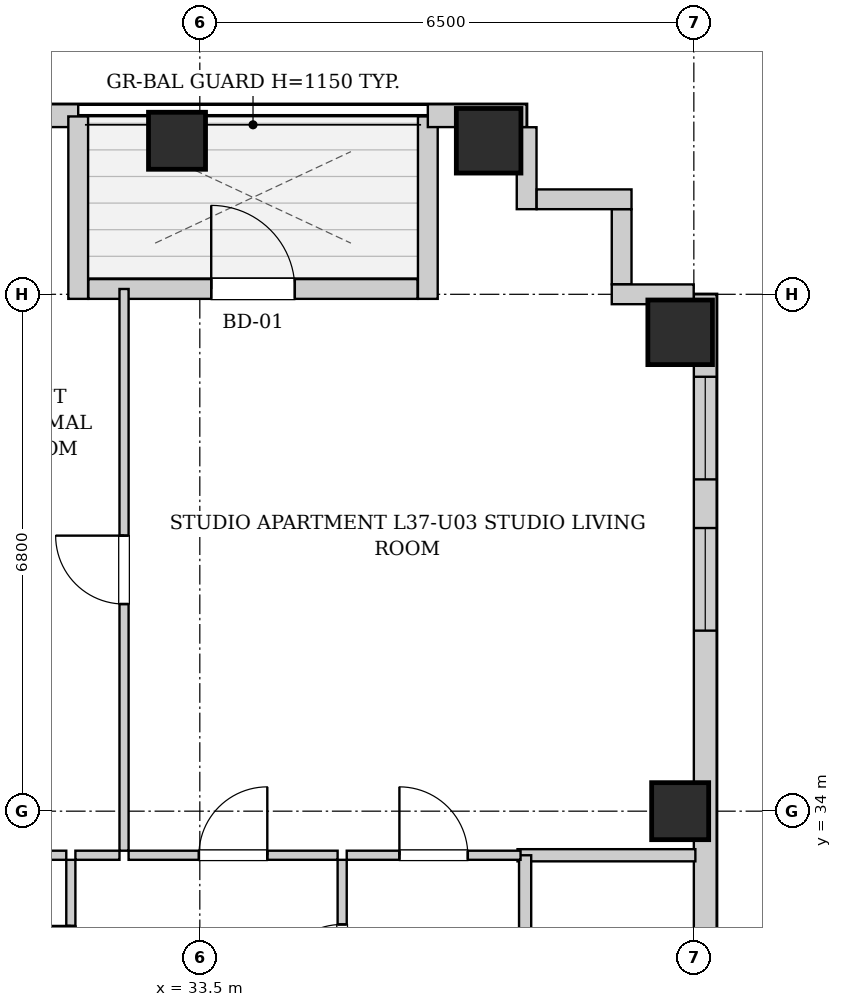
"""IFC4 building model, lengths in metres.
Left out: names, types, materials, properties, quantities, classifications, styles, units other than length and angle.
Written with IfcOpenShell. Run it as: python <this file> out.ifc"""

import sys

from ifc_helpers import new_model, si_unit, direction, frame, frame_2d, origin, origin_2d, place, context, subcontext, project, spatial, rectangle, extrude, element, fill, save


model = new_model("IFC4")
c1 = context("Model", 3, precision=1e-05, world=origin(), true_north=direction((0.0, 1.0)))
c2 = subcontext(c1, "Body", "Model", "MODEL_VIEW")
j1 = project(units=[si_unit("LENGTHUNIT", "METRE"), si_unit("PLANEANGLEUNIT", "RADIAN")], contexts=[c1])
p1 = place(None, origin())
s1 = spatial("IfcSite", under=j1, at=p1, CompositionType="ELEMENT")
p2 = place(p1, origin())
s2 = spatial("IfcBuilding", under=s1, at=p2, CompositionType="ELEMENT")
p3 = place(p2, frame((0.0, 0.0, 130.9)))
s3 = spatial("IfcBuildingStorey", under=s2, at=p3, CompositionType="ELEMENT", Elevation=130.9)
p4 = place(p3, frame((33.2, 42.82, 0.0), z_axis=(0.0, 0.0, 1.0), x_axis=(1.0, 0.0, 0.0)))
e1 = element("IfcColumn", 1, at=p4, inside=s3, PredefinedType="COLUMN", context=c2, shape_type="SweptSolid", body=[
    extrude(rectangle(XDim=0.75, YDim=0.75, at=origin_2d()), origin(), (0.0, 0.0, 1.0), 3.25),
])
p5 = place(p3, frame((37.3, 42.82, 0.0), z_axis=(0.0, 0.0, 1.0), x_axis=(1.0, 0.0, 0.0)))
e2 = element("IfcColumn", 2, at=p5, inside=s3, PredefinedType="COLUMN", context=c2, shape_type="SweptSolid", body=[
    extrude(rectangle(XDim=0.85, YDim=0.85, at=origin_2d()), origin(), (0.0, 0.0, 1.0), 3.25),
])
p6 = place(p3, frame((39.82, 34.0, 0.0), z_axis=(0.0, 0.0, 1.0), x_axis=(1.0, 0.0, 0.0)))
e3 = element("IfcColumn", 3, at=p6, inside=s3, PredefinedType="COLUMN", context=c2, shape_type="SweptSolid", body=[
    extrude(rectangle(XDim=0.75, YDim=0.75, at=origin_2d()), origin(), (0.0, 0.0, 1.0), 3.25),
])
p7 = place(p3, frame((39.82, 40.3, 0.0), z_axis=(0.0, 0.0, 1.0), x_axis=(1.0, 0.0, 0.0)))
e4 = element("IfcColumn", 4, at=p7, inside=s3, PredefinedType="COLUMN", context=c2, shape_type="SweptSolid", body=[
    extrude(rectangle(XDim=0.85, YDim=0.85, at=origin_2d()), origin(), (0.0, 0.0, 1.0), 3.25),
])
p8 = place(p3, frame((10.0, 43.15, 0.0), z_axis=(0.0, 0.0, 1.0), x_axis=(1.0, 0.0, 0.0)))
e5 = element("IfcWall", 5, at=p8, inside=s3, PredefinedType="SOLIDWALL", context=c2, shape_type="SweptSolid", body=[
    extrude(rectangle(XDim=21.9, YDim=0.3, at=frame_2d((10.95, 0.0))), origin(), (0.0, 0.0, 1.0), 2.99),
])
p9 = place(p8, frame((5.475, 0.0, 0.55)))
e6 = element("IfcOpeningElement", 6, at=p9, cuts=e5, PredefinedType="OPENING", context=c2, shape_type="SweptSolid", body=[
    extrude(rectangle(XDim=1.35, YDim=1.2, at=frame_2d((0.675, 0.6))), frame((0.0, 0.16, 0.0), z_axis=(0.0, -1.0, 0.0), x_axis=(1.0, 0.0, 0.0)), (0.0, 0.0, 1.0), 0.32),
])
p10 = place(p8, frame((9.15, 0.0, 0.55)))
e7 = element("IfcOpeningElement", 7, at=p10, cuts=e5, PredefinedType="OPENING", context=c2, shape_type="SweptSolid", body=[
    extrude(rectangle(XDim=1.35, YDim=1.2, at=frame_2d((0.675, 0.6))), frame((0.0, 0.16, 0.0), z_axis=(0.0, -1.0, 0.0), x_axis=(1.0, 0.0, 0.0)), (0.0, 0.0, 1.0), 0.32),
])
p11 = place(p8, frame((17.5, 0.0, 0.55)))
e8 = element("IfcOpeningElement", 8, at=p11, cuts=e5, PredefinedType="OPENING", context=c2, shape_type="SweptSolid", body=[
    extrude(rectangle(XDim=1.35, YDim=1.2, at=frame_2d((0.675, 0.6))), frame((0.0, 0.16, 0.0), z_axis=(0.0, -1.0, 0.0), x_axis=(1.0, 0.0, 0.0)), (0.0, 0.0, 1.0), 0.32),
])
p12 = place(p8, frame((19.8, 0.0, 0.55)))
e9 = element("IfcOpeningElement", 9, at=p12, cuts=e5, PredefinedType="OPENING", context=c2, shape_type="SweptSolid", body=[
    extrude(rectangle(XDim=1.35, YDim=1.2, at=frame_2d((0.675, 0.6))), frame((0.0, 0.16, 0.0), z_axis=(0.0, -1.0, 0.0), x_axis=(1.0, 0.0, 0.0)), (0.0, 0.0, 1.0), 0.32),
])
p13 = place(p3, frame((31.9, 43.14, 0.0), z_axis=(0.0, 0.0, 1.0), x_axis=(0.0, -1.0, 0.0)))
e10 = element("IfcWall", 10, at=p13, inside=s3, PredefinedType="SOLIDWALL", context=c2, shape_type="SweptSolid", body=[
    extrude(rectangle(XDim=2.4, YDim=0.26, at=frame_2d((1.2, 0.0))), origin(), (0.0, 0.0, 1.0), 2.99),
])
p14 = place(p3, frame((32.034, 40.87, 0.0), z_axis=(0.0, 0.0, 1.0), x_axis=(1.0, 0.0, 0.0)))
e11 = element("IfcWall", 11, at=p14, inside=s3, PredefinedType="SOLIDWALL", context=c2, shape_type="SweptSolid", body=[
    extrude(rectangle(XDim=4.332, YDim=0.26, at=frame_2d((2.166, 0.0))), origin(), (0.0, 0.0, 1.0), 2.99),
])
p15 = place(p14, frame((1.616, 0.0, 0.0)))
e12 = element("IfcOpeningElement", 12, at=p15, cuts=e11, PredefinedType="OPENING", context=c2, shape_type="SweptSolid", body=[
    extrude(rectangle(XDim=1.1, YDim=2.0, at=frame_2d((0.55, 1.0))), frame((0.0, 0.14, 0.0), z_axis=(0.0, -1.0, 0.0), x_axis=(1.0, 0.0, 0.0)), (0.0, 0.0, 1.0), 0.28),
])
p16 = place(p3, frame((36.5, 40.74, 0.0), z_axis=(0.0, 0.0, 1.0), x_axis=(0.0, 1.0, 0.0)))
e13 = element("IfcWall", 13, at=p16, inside=s3, PredefinedType="SOLIDWALL", context=c2, shape_type="SweptSolid", body=[
    extrude(rectangle(XDim=2.4, YDim=0.26, at=frame_2d((1.2, 0.0))), origin(), (0.0, 0.0, 1.0), 2.99),
])
p17 = place(p3, frame((36.5, 43.15, 0.0), z_axis=(0.0, 0.0, 1.0), x_axis=(1.0, 0.0, 0.0)))
e14 = element("IfcWall", 14, at=p17, inside=s3, PredefinedType="SOLIDWALL", context=c2, shape_type="SweptSolid", body=[
    extrude(rectangle(XDim=1.3, YDim=0.3, at=frame_2d((0.65, 0.0))), origin(), (0.0, 0.0, 1.0), 2.99),
])
p18 = place(p3, frame((40.15, 40.8, 0.0), z_axis=(0.0, 0.0, 1.0), x_axis=(0.0, -1.0, 0.0)))
e15 = element("IfcWall", 15, at=p18, inside=s3, PredefinedType="SOLIDWALL", context=c2, shape_type="SweptSolid", body=[
    extrude(rectangle(XDim=34.5, YDim=0.3, at=frame_2d((17.25, 0.0))), origin(), (0.0, 0.0, 1.0), 2.99),
])
p19 = place(p18, frame((31.575, 0.0, 0.55)))
e16 = element("IfcOpeningElement", 16, at=p19, cuts=e15, PredefinedType="OPENING", context=c2, shape_type="SweptSolid", body=[
    extrude(rectangle(XDim=1.35, YDim=1.2, at=frame_2d((0.675, 0.6))), frame((0.0, 0.16, 0.0), z_axis=(0.0, -1.0, 0.0), x_axis=(1.0, 0.0, 0.0)), (0.0, 0.0, 1.0), 0.32),
])
p20 = place(p18, frame((3.075, 0.0, 0.55)))
e17 = element("IfcOpeningElement", 17, at=p20, cuts=e15, PredefinedType="OPENING", context=c2, shape_type="SweptSolid", body=[
    extrude(rectangle(XDim=1.35, YDim=1.2, at=frame_2d((0.675, 0.6))), frame((0.0, 0.16, 0.0), z_axis=(0.0, -1.0, 0.0), x_axis=(1.0, 0.0, 0.0)), (0.0, 0.0, 1.0), 0.32),
])
p21 = place(p18, frame((1.085, 0.0, 0.55)))
e18 = element("IfcOpeningElement", 18, at=p21, cuts=e15, PredefinedType="OPENING", context=c2, shape_type="SweptSolid", body=[
    extrude(rectangle(XDim=1.35, YDim=1.2, at=frame_2d((0.675, 0.6))), frame((0.0, 0.16, 0.0), z_axis=(0.0, -1.0, 0.0), x_axis=(1.0, 0.0, 0.0)), (0.0, 0.0, 1.0), 0.32),
])
p22 = place(p18, frame((22.8, 0.0, 0.55)))
e19 = element("IfcOpeningElement", 19, at=p22, cuts=e15, PredefinedType="OPENING", context=c2, shape_type="SweptSolid", body=[
    extrude(rectangle(XDim=1.35, YDim=1.2, at=frame_2d((0.675, 0.6))), frame((0.0, 0.16, 0.0), z_axis=(0.0, -1.0, 0.0), x_axis=(1.0, 0.0, 0.0)), (0.0, 0.0, 1.0), 0.32),
])
p23 = place(p18, frame((13.425, 0.0, 0.55)))
e20 = element("IfcOpeningElement", 20, at=p23, cuts=e15, PredefinedType="OPENING", context=c2, shape_type="SweptSolid", body=[
    extrude(rectangle(XDim=1.35, YDim=1.2, at=frame_2d((0.675, 0.6))), frame((0.0, 0.16, 0.0), z_axis=(0.0, -1.0, 0.0), x_axis=(1.0, 0.0, 0.0)), (0.0, 0.0, 1.0), 0.32),
])
p24 = place(p3, frame((37.8, 42.998, 0.0), z_axis=(0.0, 0.0, 1.0), x_axis=(0.0, -1.0, 0.0)))
e21 = element("IfcWall", 21, at=p24, inside=s3, PredefinedType="SOLIDWALL", context=c2, shape_type="SweptSolid", body=[
    extrude(rectangle(XDim=1.078, YDim=0.26, at=frame_2d((0.539, 0.0))), origin(), (0.0, 0.0, 1.0), 2.99),
])
p25 = place(p3, frame((37.932, 42.05, 0.0), z_axis=(0.0, 0.0, 1.0), x_axis=(1.0, 0.0, 0.0)))
e22 = element("IfcWall", 22, at=p25, inside=s3, PredefinedType="SOLIDWALL", context=c2, shape_type="SweptSolid", body=[
    extrude(rectangle(XDim=1.248, YDim=0.26, at=frame_2d((0.624, 0.0))), origin(), (0.0, 0.0, 1.0), 2.99),
])
p26 = place(p3, frame((39.05, 41.918, 0.0), z_axis=(0.0, 0.0, 1.0), x_axis=(0.0, -1.0, 0.0)))
e23 = element("IfcWall", 23, at=p26, inside=s3, PredefinedType="SOLIDWALL", context=c2, shape_type="SweptSolid", body=[
    extrude(rectangle(XDim=0.986, YDim=0.26, at=frame_2d((0.493, 0.0))), origin(), (0.0, 0.0, 1.0), 2.99),
])
p27 = place(p3, frame((38.92, 40.8, 0.0), z_axis=(0.0, 0.0, 1.0), x_axis=(1.0, 0.0, 0.0)))
e24 = element("IfcWall", 24, at=p27, inside=s3, PredefinedType="SOLIDWALL", context=c2, shape_type="SweptSolid", body=[
    extrude(rectangle(XDim=1.078, YDim=0.26, at=frame_2d((0.539, 0.0))), origin(), (0.0, 0.0, 1.0), 2.99),
])
p28 = place(p3, frame((37.68, 33.42, 0.0), z_axis=(0.0, 0.0, 1.0), x_axis=(1.0, 0.0, 0.0)))
e25 = element("IfcWall", 25, at=p28, inside=s3, PredefinedType="PARTITIONING", context=c2, shape_type="SweptSolid", body=[
    extrude(rectangle(XDim=2.34, YDim=0.16, at=frame_2d((1.17, 0.0))), origin(), (0.0, 0.0, 1.0), 2.99),
])
p29 = place(p3, frame((37.78, 30.76, 0.0), z_axis=(0.0, 0.0, 1.0), x_axis=(0.0, 1.0, 0.0)))
e26 = element("IfcWall", 26, at=p29, inside=s3, PredefinedType="PARTITIONING", context=c2, shape_type="SweptSolid", body=[
    extrude(rectangle(XDim=2.66, YDim=0.16, at=frame_2d((1.33, 0.0))), origin(), (0.0, 0.0, 1.0), 2.99),
])
p30 = place(p3, frame((31.803, 30.76, 0.0), z_axis=(0.0, 0.0, 1.0), x_axis=(0.0, 1.0, 0.0)))
e27 = element("IfcWall", 27, at=p30, inside=s3, PredefinedType="PARTITIONING", context=c2, shape_type="SweptSolid", body=[
    extrude(rectangle(XDim=2.6, YDim=0.12, at=frame_2d((1.3, 0.0))), origin(), (0.0, 0.0, 1.0), 2.99),
])
p31 = place(p30, frame((0.87, 0.0, 0.0)))
e28 = element("IfcOpeningElement", 28, at=p31, cuts=e27, PredefinedType="OPENING", context=c2, shape_type="SweptSolid", body=[
    extrude(rectangle(XDim=0.86, YDim=2.05, at=frame_2d((0.43, 1.025))), frame((0.0, 0.07, 0.0), z_axis=(0.0, -1.0, 0.0), x_axis=(1.0, 0.0, 0.0)), (0.0, 0.0, 1.0), 0.14),
])
p32 = place(p3, frame((29.343, 33.42, 0.0), z_axis=(0.0, 0.0, 1.0), x_axis=(1.0, 0.0, 0.0)))
e29 = element("IfcWall", 29, at=p32, inside=s3, PredefinedType="PARTITIONING", context=c2, shape_type="SweptSolid", body=[
    extrude(rectangle(XDim=2.4, YDim=0.12, at=frame_2d((1.2, 0.0))), origin(), (0.0, 0.0, 1.0), 2.99),
])
p33 = place(p3, frame((35.373, 30.76, 0.0), z_axis=(0.0, 0.0, 1.0), x_axis=(0.0, 1.0, 0.0)))
e30 = element("IfcWall", 30, at=p33, inside=s3, PredefinedType="PARTITIONING", context=c2, shape_type="SweptSolid", body=[
    extrude(rectangle(XDim=2.6, YDim=0.12, at=frame_2d((1.3, 0.0))), origin(), (0.0, 0.0, 1.0), 2.99),
])
p34 = place(p33, frame((0.85, 0.0, 0.0)))
e31 = element("IfcOpeningElement", 31, at=p34, cuts=e30, PredefinedType="OPENING", context=c2, shape_type="SweptSolid", body=[
    extrude(rectangle(XDim=0.9, YDim=2.05, at=frame_2d((0.45, 1.025))), frame((0.0, 0.07, 0.0), z_axis=(0.0, -1.0, 0.0), x_axis=(1.0, 0.0, 0.0)), (0.0, 0.0, 1.0), 0.14),
])
p35 = place(p3, frame((31.863, 33.42, 0.0), z_axis=(0.0, 0.0, 1.0), x_axis=(1.0, 0.0, 0.0)))
e32 = element("IfcWall", 32, at=p35, inside=s3, PredefinedType="PARTITIONING", context=c2, shape_type="SweptSolid", body=[
    extrude(rectangle(XDim=0.58, YDim=0.12, at=frame_2d((0.29, 0.0))), origin(), (0.0, 0.0, 1.0), 2.99),
])
p36 = place(p3, frame((32.563, 33.42, 0.0), z_axis=(0.0, 0.0, 1.0), x_axis=(1.0, 0.0, 0.0)))
e33 = element("IfcWall", 33, at=p36, inside=s3, PredefinedType="PARTITIONING", context=c2, shape_type="SweptSolid", body=[
    extrude(rectangle(XDim=2.75, YDim=0.12, at=frame_2d((1.375, 0.0))), origin(), (0.0, 0.0, 1.0), 2.99),
])
p37 = place(p36, frame((0.925, 0.0, 0.0)))
e34 = element("IfcOpeningElement", 34, at=p37, cuts=e33, PredefinedType="OPENING", context=c2, shape_type="SweptSolid", body=[
    extrude(rectangle(XDim=0.9, YDim=2.05, at=frame_2d((0.45, 1.025))), frame((0.0, 0.07, 0.0), z_axis=(0.0, -1.0, 0.0), x_axis=(1.0, 0.0, 0.0)), (0.0, 0.0, 1.0), 0.14),
])
p38 = place(p3, frame((35.433, 33.42, 0.0), z_axis=(0.0, 0.0, 1.0), x_axis=(1.0, 0.0, 0.0)))
e35 = element("IfcWall", 35, at=p38, inside=s3, PredefinedType="PARTITIONING", context=c2, shape_type="SweptSolid", body=[
    extrude(rectangle(XDim=2.287, YDim=0.12, at=frame_2d((1.144, 0.0))), origin(), (0.0, 0.0, 1.0), 2.99),
])
p39 = place(p38, frame((0.693, 0.0, 0.0)))
e36 = element("IfcOpeningElement", 36, at=p39, cuts=e35, PredefinedType="OPENING", context=c2, shape_type="SweptSolid", body=[
    extrude(rectangle(XDim=0.9, YDim=2.05, at=frame_2d((0.45, 1.025))), frame((0.0, 0.07, 0.0), z_axis=(0.0, -1.0, 0.0), x_axis=(1.0, 0.0, 0.0)), (0.0, 0.0, 1.0), 0.14),
])
p40 = place(p3, frame((32.503, 33.48, 0.0), z_axis=(0.0, 0.0, 1.0), x_axis=(0.0, 1.0, 0.0)))
e37 = element("IfcWall", 37, at=p40, inside=s3, PredefinedType="PARTITIONING", context=c2, shape_type="SweptSolid", body=[
    extrude(rectangle(XDim=7.39, YDim=0.12, at=frame_2d((3.695, 0.0))), origin(), (0.0, 0.0, 1.0), 2.99),
])
p41 = place(p40, frame((3.245, 0.0, 0.0)))
e38 = element("IfcOpeningElement", 38, at=p41, cuts=e37, PredefinedType="OPENING", context=c2, shape_type="SweptSolid", body=[
    extrude(rectangle(XDim=0.9, YDim=2.05, at=frame_2d((0.45, 1.025))), frame((0.0, 0.07, 0.0), z_axis=(0.0, -1.0, 0.0), x_axis=(1.0, 0.0, 0.0)), (0.0, 0.0, 1.0), 0.14),
])
p42 = place(p31, origin())
e39 = element("IfcDoor", 39, at=p42, inside=s3, OperationType="SINGLE_SWING_RIGHT", PredefinedType="DOOR", context=c2, shape_type="SweptSolid", body=[
    extrude(rectangle(XDim=0.86, YDim=2.05, at=frame_2d((0.43, 1.025))), frame((0.0, 0.025, 0.0), z_axis=(0.0, -1.0, 0.0), x_axis=(1.0, 0.0, 0.0)), (0.0, 0.0, 1.0), 0.05),
])
fill(e28, e39)
p43 = place(p34, origin())
e40 = element("IfcDoor", 40, at=p43, inside=s3, OperationType="SINGLE_SWING_LEFT", PredefinedType="DOOR", context=c2, shape_type="SweptSolid", body=[
    extrude(rectangle(XDim=0.9, YDim=2.05, at=frame_2d((0.45, 1.025))), frame((0.0, 0.025, 0.0), z_axis=(0.0, -1.0, 0.0), x_axis=(1.0, 0.0, 0.0)), (0.0, 0.0, 1.0), 0.05),
])
fill(e31, e40)
p44 = place(p37, origin())
e41 = element("IfcDoor", 41, at=p44, inside=s3, OperationType="SINGLE_SWING_RIGHT", PredefinedType="DOOR", context=c2, shape_type="SweptSolid", body=[
    extrude(rectangle(XDim=0.9, YDim=2.05, at=frame_2d((0.45, 1.025))), frame((0.0, 0.025, 0.0), z_axis=(0.0, -1.0, 0.0), x_axis=(1.0, 0.0, 0.0)), (0.0, 0.0, 1.0), 0.05),
])
fill(e34, e41)
p45 = place(p39, origin())
e42 = element("IfcDoor", 42, at=p45, inside=s3, OperationType="SINGLE_SWING_LEFT", PredefinedType="DOOR", context=c2, shape_type="SweptSolid", body=[
    extrude(rectangle(XDim=0.9, YDim=2.05, at=frame_2d((0.45, 1.025))), frame((0.0, 0.025, 0.0), z_axis=(0.0, -1.0, 0.0), x_axis=(1.0, 0.0, 0.0)), (0.0, 0.0, 1.0), 0.05),
])
fill(e36, e42)
p46 = place(p41, origin())
e43 = element("IfcDoor", 43, at=p46, inside=s3, OperationType="SINGLE_SWING_RIGHT", PredefinedType="DOOR", context=c2, shape_type="SweptSolid", body=[
    extrude(rectangle(XDim=0.9, YDim=2.05, at=frame_2d((0.45, 1.025))), frame((0.0, 0.025, 0.0), z_axis=(0.0, -1.0, 0.0), x_axis=(1.0, 0.0, 0.0)), (0.0, 0.0, 1.0), 0.05),
])
fill(e38, e43)
p47 = place(p15, origin())
e44 = element("IfcDoor", 44, at=p47, inside=s3, OperationType="SINGLE_SWING_LEFT", PredefinedType="DOOR", context=c2, shape_type="SweptSolid", body=[
    extrude(rectangle(XDim=1.1, YDim=2.0, at=frame_2d((0.55, 1.0))), frame((0.0, 0.025, 0.0), z_axis=(0.0, -1.0, 0.0), x_axis=(1.0, 0.0, 0.0)), (0.0, 0.0, 1.0), 0.05),
])
fill(e12, e44)
p48 = place(p20, origin())
e45 = element("IfcWindow", 45, at=p48, inside=s3, PartitioningType="SINGLE_PANEL", PredefinedType="WINDOW", context=c2, shape_type="SweptSolid", body=[
    extrude(rectangle(XDim=1.35, YDim=1.2, at=frame_2d((0.675, 0.6))), frame((0.0, 0.03, 0.0), z_axis=(0.0, -1.0, 0.0), x_axis=(1.0, 0.0, 0.0)), (0.0, 0.0, 1.0), 0.06),
])
fill(e17, e45)
p49 = place(p21, origin())
e46 = element("IfcWindow", 46, at=p49, inside=s3, PartitioningType="SINGLE_PANEL", PredefinedType="WINDOW", context=c2, shape_type="SweptSolid", body=[
    extrude(rectangle(XDim=1.35, YDim=1.2, at=frame_2d((0.675, 0.6))), frame((0.0, 0.03, 0.0), z_axis=(0.0, -1.0, 0.0), x_axis=(1.0, 0.0, 0.0)), (0.0, 0.0, 1.0), 0.06),
])
fill(e18, e46)
save(model, sys.argv[1])
